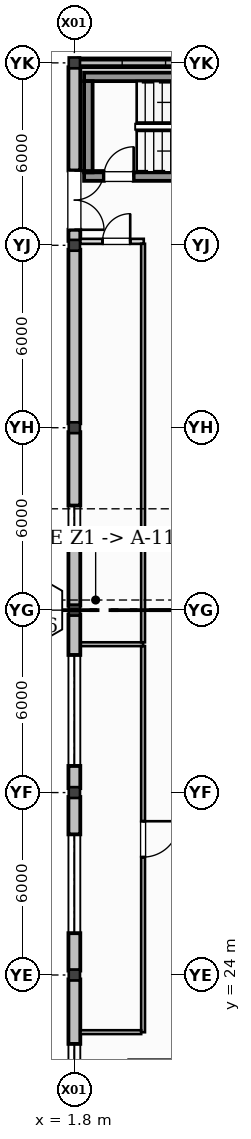
"""IFC4 building model, lengths in metres.
Left out: names, types, materials, properties, quantities, classifications, styles, units other than length and angle.
Written with IfcOpenShell. Run it as: python <this file> out.ifc"""

import sys

from ifc_helpers import new_model, si_unit, direction, frame, frame_2d, origin, origin_2d, place, context, subcontext, project, spatial, rectangle, i_section, extrude, element, fill, save


model = new_model("IFC4")
c1 = context("Model", 3, precision=1e-05, world=origin(), true_north=direction((0.0, 1.0)))
c2 = subcontext(c1, "Body", "Model", "MODEL_VIEW")
j1 = project(units=[si_unit("LENGTHUNIT", "METRE"), si_unit("PLANEANGLEUNIT", "RADIAN")], contexts=[c1])
p1 = place(None, origin())
s1 = spatial("IfcSite", under=j1, at=p1, CompositionType="ELEMENT")
p2 = place(p1, origin())
s2 = spatial("IfcBuilding", under=s1, at=p2, CompositionType="ELEMENT")
p3 = place(p2, origin())
s3 = spatial("IfcBuildingStorey", under=s2, at=p3, CompositionType="ELEMENT", Elevation=0.0)
for number, where, z_axis, x_axis in (
    (1, (1.8, 24.0, -0.41), (0.0, 0.0, 1.0), (1.0, 0.0, 0.0)),
    (2, (1.8, 30.0, -0.41), (0.0, 0.0, 1.0), (1.0, 0.0, 0.0)),
    (3, (1.8, 36.0, -0.41), (0.0, 0.0, 1.0), (1.0, 0.0, 0.0)),
    (4, (1.8, 42.0, -0.41), (0.0, 0.0, 1.0), (1.0, 0.0, 0.0)),
    (5, (1.8, 48.0, -0.41), (0.0, 0.0, 1.0), (1.0, 0.0, 0.0)),
    (6, (1.8, 54.0, -0.41), (0.0, 0.0, 1.0), (1.0, 0.0, 0.0)),
):
    element("IfcColumn", number, at=place(p3, frame(where, z_axis=z_axis, x_axis=x_axis)), inside=s3, PredefinedType="COLUMN", context=c2, shape_type="SweptSolid", body=[
        extrude(i_section(OverallWidth=0.369, OverallDepth=0.356, WebThickness=0.011, FlangeThickness=0.018, at=origin_2d()), origin(), (0.0, 0.0, 1.0), 6.41),
    ])
p4 = place(p3, frame((7.655, 54.0, 0.0), z_axis=(0.0, 0.0, 1.0), x_axis=(-1.0, 0.0, 0.0)))
e7 = element("IfcWall", 7, at=p4, inside=s3, PredefinedType="STANDARD", context=c2, shape_type="SweptSolid", body=[
    extrude(rectangle(XDim=5.71, YDim=0.29, at=frame_2d((2.855, 0.0))), origin(), (0.0, 0.0, 1.0), 0.92),
])
p5 = place(p3, frame((1.8, 23.855, 0.0), z_axis=(0.0, 0.0, 1.0), x_axis=(0.0, -1.0, 0.0)))
e8 = element("IfcWall", 8, at=p5, inside=s3, PredefinedType="STANDARD", context=c2, shape_type="SweptSolid", body=[
    extrude(rectangle(XDim=5.71, YDim=0.39, at=frame_2d((2.855, 0.0))), origin(), (0.0, 0.0, 1.0), 6.0),
])
p6 = place(p5, frame((2.121, 0.0, 1.0)))
e9 = element("IfcOpeningElement", 9, at=p6, cuts=e8, PredefinedType="OPENING", context=c2, shape_type="SweptSolid", body=[
    extrude(rectangle(XDim=2.85, YDim=1.08, at=frame_2d((1.425, 0.54))), frame((0.0, 0.205, 0.0), z_axis=(0.0, -1.0, 0.0), x_axis=(1.0, 0.0, 0.0)), (0.0, 0.0, 1.0), 0.41),
])
p7 = place(p3, frame((1.8, 29.855, 0.0), z_axis=(0.0, 0.0, 1.0), x_axis=(0.0, -1.0, 0.0)))
e10 = element("IfcWall", 10, at=p7, inside=s3, PredefinedType="STANDARD", context=c2, shape_type="SweptSolid", body=[
    extrude(rectangle(XDim=5.71, YDim=0.39, at=frame_2d((2.855, 0.0))), origin(), (0.0, 0.0, 1.0), 6.0),
])
p8 = place(p7, frame((1.23, 0.0, 1.0)))
e11 = element("IfcOpeningElement", 11, at=p8, cuts=e10, PredefinedType="OPENING", context=c2, shape_type="SweptSolid", body=[
    extrude(rectangle(XDim=3.25, YDim=1.08, at=frame_2d((1.625, 0.54))), frame((0.0, 0.205, 0.0), z_axis=(0.0, -1.0, 0.0), x_axis=(1.0, 0.0, 0.0)), (0.0, 0.0, 1.0), 0.41),
])
p9 = place(p3, frame((1.8, 35.855, 0.0), z_axis=(0.0, 0.0, 1.0), x_axis=(0.0, -1.0, 0.0)))
e12 = element("IfcWall", 12, at=p9, inside=s3, PredefinedType="STANDARD", context=c2, shape_type="SweptSolid", body=[
    extrude(rectangle(XDim=5.71, YDim=0.39, at=frame_2d((2.855, 0.0))), origin(), (0.0, 0.0, 1.0), 6.0),
])
p10 = place(p9, frame((1.329, 0.0, 1.0)))
e13 = element("IfcOpeningElement", 13, at=p10, cuts=e12, PredefinedType="OPENING", context=c2, shape_type="SweptSolid", body=[
    extrude(rectangle(XDim=3.65, YDim=1.08, at=frame_2d((1.825, 0.54))), frame((0.0, 0.205, 0.0), z_axis=(0.0, -1.0, 0.0), x_axis=(1.0, 0.0, 0.0)), (0.0, 0.0, 1.0), 0.41),
])
p11 = place(p3, frame((1.8, 41.855, 0.0), z_axis=(0.0, 0.0, 1.0), x_axis=(0.0, -1.0, 0.0)))
e14 = element("IfcWall", 14, at=p11, inside=s3, PredefinedType="STANDARD", context=c2, shape_type="SweptSolid", body=[
    extrude(rectangle(XDim=5.71, YDim=0.39, at=frame_2d((2.855, 0.0))), origin(), (0.0, 0.0, 1.0), 6.0),
])
p12 = place(p11, frame((2.415, 0.0, 0.85)))
e15 = element("IfcOpeningElement", 15, at=p12, cuts=e14, PredefinedType="OPENING", context=c2, shape_type="SweptSolid", body=[
    extrude(rectangle(XDim=0.88, YDim=1.95, at=frame_2d((0.44, 0.975))), frame((0.0, 0.205, 0.0), z_axis=(0.0, -1.0, 0.0), x_axis=(1.0, 0.0, 0.0)), (0.0, 0.0, 1.0), 0.41),
])
p13 = place(p3, frame((1.8, 47.855, 0.0), z_axis=(0.0, 0.0, 1.0), x_axis=(0.0, -1.0, 0.0)))
e16 = element("IfcWall", 16, at=p13, inside=s3, PredefinedType="STANDARD", context=c2, shape_type="SweptSolid", body=[
    extrude(rectangle(XDim=5.71, YDim=0.39, at=frame_2d((2.855, 0.0))), origin(), (0.0, 0.0, 1.0), 5.044),
])
p14 = place(p3, frame((1.8, 53.855, 0.0), z_axis=(0.0, 0.0, 1.0), x_axis=(0.0, -1.0, 0.0)))
e17 = element("IfcWall", 17, at=p14, inside=s3, PredefinedType="STANDARD", context=c2, shape_type="SweptSolid", body=[
    extrude(rectangle(XDim=5.71, YDim=0.39, at=frame_2d((2.855, 0.0))), origin(), (0.0, 0.0, 1.0), 5.044),
])
p15 = place(p14, frame((3.394, 0.0, 0.0)))
e18 = element("IfcOpeningElement", 18, at=p15, cuts=e17, PredefinedType="OPENING", context=c2, shape_type="SweptSolid", body=[
    extrude(rectangle(XDim=1.95, YDim=2.35, at=frame_2d((0.975, 1.175))), frame((0.0, 0.205, 0.0), z_axis=(0.0, -1.0, 0.0), x_axis=(1.0, 0.0, 0.0)), (0.0, 0.0, 1.0), 0.41),
])
p16 = place(p3, frame((2.12, 50.26, 0.0), z_axis=(0.0, 0.0, 1.0), x_axis=(1.0, 0.0, 0.0)))
e19 = element("IfcWall", 19, at=p16, inside=s3, PredefinedType="SHEAR", context=c2, shape_type="SweptSolid", body=[
    extrude(rectangle(XDim=8.16, YDim=0.28, at=frame_2d((4.08, 0.0))), origin(), (0.0, 0.0, 1.0), 6.0),
])
p17 = place(p16, frame((0.65, 0.0, 0.0)))
e20 = element("IfcOpeningElement", 20, at=p17, cuts=e19, PredefinedType="OPENING", context=c2, shape_type="SweptSolid", body=[
    extrude(rectangle(XDim=0.98, YDim=2.15, at=frame_2d((0.49, 1.075))), frame((0.0, 0.15, 0.0), z_axis=(0.0, -1.0, 0.0), x_axis=(1.0, 0.0, 0.0)), (0.0, 0.0, 1.0), 0.3),
])
p18 = place(p3, frame((10.28, 53.54, 0.0), z_axis=(0.0, 0.0, 1.0), x_axis=(-1.0, 0.0, 0.0)))
e21 = element("IfcWall", 21, at=p18, inside=s3, PredefinedType="SHEAR", context=c2, shape_type="SweptSolid", body=[
    extrude(rectangle(XDim=8.16, YDim=0.28, at=frame_2d((4.08, 0.0))), origin(), (0.0, 0.0, 1.0), 6.0),
])
p19 = place(p3, frame((2.26, 53.4, 0.0), z_axis=(0.0, 0.0, 1.0), x_axis=(0.0, -1.0, 0.0)))
e22 = element("IfcWall", 22, at=p19, inside=s3, PredefinedType="SHEAR", context=c2, shape_type="SweptSolid", body=[
    extrude(rectangle(XDim=3.0, YDim=0.28, at=frame_2d((1.5, 0.0))), origin(), (0.0, 0.0, 1.0), 6.0),
])
p20 = place(p3, frame((5.015, 21.115, 0.0), z_axis=(0.0, 0.0, 1.0), x_axis=(-1.0, 0.0, 0.0)))
e23 = element("IfcWall", 23, at=p20, inside=s3, PredefinedType="PARTITIONING", context=c2, shape_type="SweptSolid", body=[
    extrude(rectangle(XDim=1.43, YDim=0.2, at=frame_2d((0.715, 0.0))), origin(), (0.0, 0.0, 1.0), 5.68),
])
p21 = place(p3, frame((1.995, 34.88, 0.0), z_axis=(0.0, 0.0, 1.0), x_axis=(1.0, 0.0, 0.0)))
e24 = element("IfcWall", 24, at=p21, inside=s3, PredefinedType="PARTITIONING", context=c2, shape_type="SweptSolid", body=[
    extrude(rectangle(XDim=2.067, YDim=0.125, at=frame_2d((1.034, 0.0))), origin(), (0.0, 0.0, 1.0), 5.68),
])
p22 = place(p3, frame((4.06, 34.817, 0.0), z_axis=(0.0, 0.0, 1.0), x_axis=(0.0, -1.0, 0.0)))
e25 = element("IfcWall", 25, at=p22, inside=s3, PredefinedType="PARTITIONING", context=c2, shape_type="SweptSolid", body=[
    extrude(rectangle(XDim=12.7, YDim=0.125, at=frame_2d((6.35, 0.0))), origin(), (0.0, 0.0, 1.0), 5.68),
])
p23 = place(p22, frame((5.76, 0.0, 0.0)))
e26 = element("IfcOpeningElement", 26, at=p23, cuts=e25, PredefinedType="OPENING", context=c2, shape_type="SweptSolid", body=[
    extrude(rectangle(XDim=1.18, YDim=2.16, at=frame_2d((0.59, 1.08))), frame((0.0, 0.073, 0.0), z_axis=(0.0, -1.0, 0.0), x_axis=(1.0, 0.0, 0.0)), (0.0, 0.0, 1.0), 0.145),
])
p24 = place(p3, frame((3.998, 22.12, 0.0), z_axis=(0.0, 0.0, 1.0), x_axis=(-1.0, 0.0, 0.0)))
e27 = element("IfcWall", 27, at=p24, inside=s3, PredefinedType="PARTITIONING", context=c2, shape_type="SweptSolid", body=[
    extrude(rectangle(XDim=2.002, YDim=0.125, at=frame_2d((1.001, 0.0))), origin(), (0.0, 0.0, 1.0), 5.68),
])
p25 = place(p3, frame((1.995, 48.13, 0.0), z_axis=(0.0, 0.0, 1.0), x_axis=(1.0, 0.0, 0.0)))
e28 = element("IfcWall", 28, at=p25, inside=s3, PredefinedType="PARTITIONING", context=c2, shape_type="SweptSolid", body=[
    extrude(rectangle(XDim=2.087, YDim=0.165, at=frame_2d((1.044, 0.0))), origin(), (0.0, 0.0, 1.0), 5.113),
])
p26 = place(p25, frame((0.732, 0.0, 0.0)))
e29 = element("IfcOpeningElement", 29, at=p26, cuts=e28, PredefinedType="OPENING", context=c2, shape_type="SweptSolid", body=[
    extrude(rectangle(XDim=0.91, YDim=2.1, at=frame_2d((0.455, 1.05))), frame((0.0, 0.093, 0.0), z_axis=(0.0, -1.0, 0.0), x_axis=(1.0, 0.0, 0.0)), (0.0, 0.0, 1.0), 0.185),
])
p27 = place(p3, frame((4.06, 48.05, 0.0), z_axis=(0.0, 0.0, 1.0), x_axis=(0.0, -1.0, 0.0)))
e30 = element("IfcWall", 30, at=p27, inside=s3, PredefinedType="PARTITIONING", context=c2, shape_type="SweptSolid", body=[
    extrude(rectangle(XDim=13.108, YDim=0.125, at=frame_2d((6.554, 0.0))), origin(), (0.0, 0.0, 1.0), 5.39),
])
p28 = place(p6, origin())
e31 = element("IfcWindow", 31, at=p28, inside=s3, PartitioningType="SINGLE_PANEL", PredefinedType="WINDOW", context=c2, shape_type="SweptSolid", body=[
    extrude(rectangle(XDim=2.85, YDim=1.08, at=frame_2d((1.425, 0.54))), frame((0.0, 0.03, 0.0), z_axis=(0.0, -1.0, 0.0), x_axis=(1.0, 0.0, 0.0)), (0.0, 0.0, 1.0), 0.06),
])
fill(e9, e31)
p29 = place(p8, origin())
e32 = element("IfcWindow", 32, at=p29, inside=s3, PartitioningType="SINGLE_PANEL", PredefinedType="WINDOW", context=c2, shape_type="SweptSolid", body=[
    extrude(rectangle(XDim=3.25, YDim=1.08, at=frame_2d((1.625, 0.54))), frame((0.0, 0.03, 0.0), z_axis=(0.0, -1.0, 0.0), x_axis=(1.0, 0.0, 0.0)), (0.0, 0.0, 1.0), 0.06),
])
fill(e11, e32)
p30 = place(p10, origin())
e33 = element("IfcWindow", 33, at=p30, inside=s3, PartitioningType="SINGLE_PANEL", PredefinedType="WINDOW", context=c2, shape_type="SweptSolid", body=[
    extrude(rectangle(XDim=3.65, YDim=1.08, at=frame_2d((1.825, 0.54))), frame((0.0, 0.03, 0.0), z_axis=(0.0, -1.0, 0.0), x_axis=(1.0, 0.0, 0.0)), (0.0, 0.0, 1.0), 0.06),
])
fill(e13, e33)
p31 = place(p12, origin())
e34 = element("IfcWindow", 34, at=p31, inside=s3, PartitioningType="SINGLE_PANEL", PredefinedType="WINDOW", context=c2, shape_type="SweptSolid", body=[
    extrude(rectangle(XDim=0.88, YDim=1.95, at=frame_2d((0.44, 0.975))), frame((0.0, 0.03, 0.0), z_axis=(0.0, -1.0, 0.0), x_axis=(1.0, 0.0, 0.0)), (0.0, 0.0, 1.0), 0.06),
])
fill(e15, e34)
p32 = place(p15, frame((1.95, 0.0, 0.0), z_axis=(0.0, 0.0, 1.0), x_axis=(-1.0, 0.0, 0.0)))
e35 = element("IfcDoor", 35, at=p32, inside=s3, OperationType="DOUBLE_DOOR_SINGLE_SWING", PredefinedType="DOOR", context=c2, shape_type="SweptSolid", body=[
    extrude(rectangle(XDim=1.95, YDim=2.35, at=frame_2d((0.975, 1.175))), frame((0.0, 0.025, 0.0), z_axis=(0.0, -1.0, 0.0), x_axis=(1.0, 0.0, 0.0)), (0.0, 0.0, 1.0), 0.05),
])
fill(e18, e35)
p33 = place(p17, origin())
e36 = element("IfcDoor", 36, at=p33, inside=s3, OperationType="SINGLE_SWING_RIGHT", PredefinedType="DOOR", context=c2, shape_type="SweptSolid", body=[
    extrude(rectangle(XDim=0.98, YDim=2.15, at=frame_2d((0.49, 1.075))), frame((0.0, 0.025, 0.0), z_axis=(0.0, -1.0, 0.0), x_axis=(1.0, 0.0, 0.0)), (0.0, 0.0, 1.0), 0.05),
])
fill(e20, e36)
p34 = place(p23, frame((1.18, 0.0, 0.0), z_axis=(0.0, 0.0, 1.0), x_axis=(-1.0, 0.0, 0.0)))
e37 = element("IfcDoor", 37, at=p34, inside=s3, OperationType="SINGLE_SWING_LEFT", PredefinedType="DOOR", context=c2, shape_type="SweptSolid", body=[
    extrude(rectangle(XDim=1.18, YDim=2.16, at=frame_2d((0.59, 1.08))), frame((0.0, 0.025, 0.0), z_axis=(0.0, -1.0, 0.0), x_axis=(1.0, 0.0, 0.0)), (0.0, 0.0, 1.0), 0.05),
])
fill(e26, e37)
p35 = place(p26, frame((0.91, 0.0, 0.0), z_axis=(0.0, 0.0, 1.0), x_axis=(-1.0, 0.0, 0.0)))
e38 = element("IfcDoor", 38, at=p35, inside=s3, OperationType="SINGLE_SWING_RIGHT", PredefinedType="DOOR", context=c2, shape_type="SweptSolid", body=[
    extrude(rectangle(XDim=0.91, YDim=2.1, at=frame_2d((0.455, 1.05))), frame((0.0, 0.025, 0.0), z_axis=(0.0, -1.0, 0.0), x_axis=(1.0, 0.0, 0.0)), (0.0, 0.0, 1.0), 0.05),
])
fill(e29, e38)
save(model, sys.argv[1])
